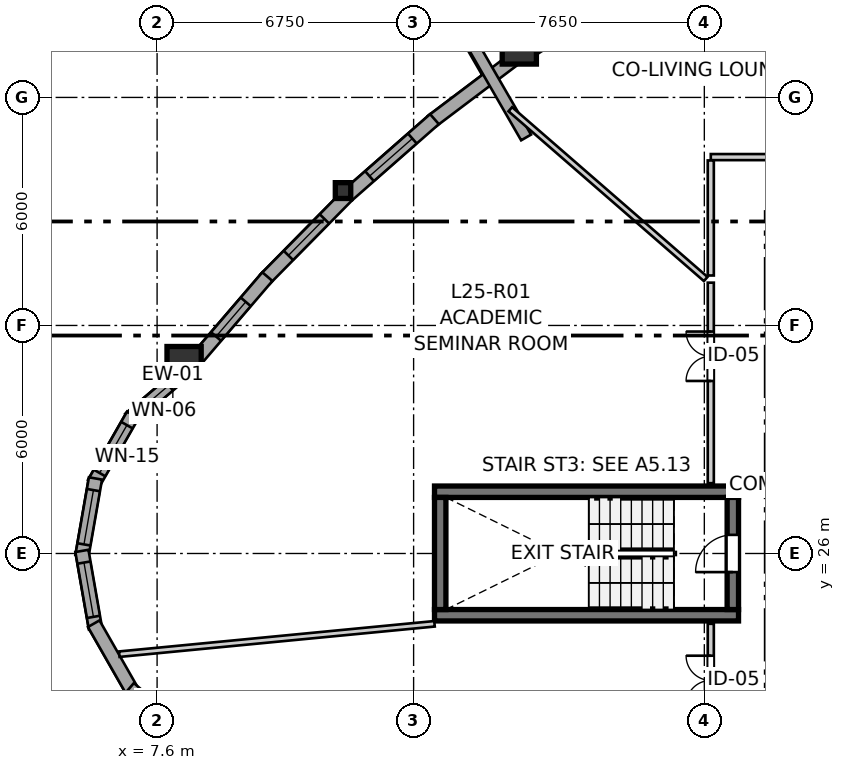
"""IFC4 building model, lengths in metres.
Left out: names, types, materials, properties, quantities, classifications, styles, units other than length and angle.
Written with IfcOpenShell. Run it as: python <this file> out.ifc"""

import sys

from ifc_helpers import new_model, si_unit, direction, frame, frame_2d, origin, origin_2d, place, context, subcontext, project, spatial, rectangle, i_section, extrude, source, transform, mapped, element, fill, save


model = new_model("IFC4")
c1 = context("Model", 3, precision=1e-05, world=origin(), true_north=direction((0.0, 1.0)))
c2 = subcontext(c1, "Body", "Model", "MODEL_VIEW")
j1 = project(units=[si_unit("LENGTHUNIT", "METRE"), si_unit("PLANEANGLEUNIT", "RADIAN")], contexts=[c1])
p1 = place(None, origin())
s1 = spatial("IfcSite", under=j1, at=p1, CompositionType="ELEMENT")
p2 = place(p1, origin())
s2 = spatial("IfcBuilding", under=s1, at=p2, CompositionType="ELEMENT")
p3 = place(p2, frame((0.0, 0.0, 86.4)))
s3 = spatial("IfcBuildingStorey", under=s2, at=p3, CompositionType="ELEMENT", Elevation=86.4)
for number, where, z_axis, x_axis in (
    (1, (14.9, 24.375, 0.0), (0.0, 0.0, 1.0), (1.0, 0.0, 0.0)),
    (2, (22.9, 27.625, 0.0), (0.0, 0.0, 1.0), (-1.0, 0.0, 0.0)),
):
    element("IfcWall", number, at=place(p3, frame(where, z_axis=z_axis, x_axis=x_axis)), inside=s3, PredefinedType="SHEAR", context=c2, shape_type="SweptSolid", body=[
        extrude(rectangle(XDim=8.0, YDim=0.3, at=frame_2d((4.0, 0.0))), origin(), (0.0, 0.0, 1.0), 2.95),
    ])
p4 = place(p3, frame((15.05, 27.475, 0.0), z_axis=(0.0, 0.0, 1.0), x_axis=(0.0, -1.0, 0.0)))
e3 = element("IfcWall", 3, at=p4, inside=s3, PredefinedType="SHEAR", context=c2, shape_type="SweptSolid", body=[
    extrude(rectangle(XDim=2.95, YDim=0.3, at=frame_2d((1.475, 0.0))), origin(), (0.0, 0.0, 1.0), 2.95),
])
p5 = place(p3, frame((22.75, 24.525, 0.0), z_axis=(0.0, 0.0, 1.0), x_axis=(0.0, 1.0, 0.0)))
e4 = element("IfcWall", 4, at=p5, inside=s3, PredefinedType="SHEAR", context=c2, shape_type="SweptSolid", body=[
    extrude(rectangle(XDim=2.95, YDim=0.3, at=frame_2d((1.475, 0.0))), origin(), (0.0, 0.0, 1.0), 2.95),
])
p6 = place(p5, frame((0.985, 0.0, 0.0)))
e5 = element("IfcOpeningElement", 5, at=p6, cuts=e4, PredefinedType="OPENING", context=c2, shape_type="SweptSolid", body=[
    extrude(rectangle(XDim=0.98, YDim=2.15, at=frame_2d((0.49, 1.075))), frame((0.0, 0.16, 0.0), z_axis=(0.0, -1.0, 0.0), x_axis=(1.0, 0.0, 0.0)), (0.0, 0.0, 1.0), 0.32),
])
m1 = source(origin(), c2, "Body", "SweptSolid", [
    extrude(rectangle(XDim=0.9, YDim=0.9, at=origin_2d()), origin(), (0.0, 0.0, 1.0), 2.95),
])
for number, where, z_axis, x_axis in (
    (6, (8.31, 30.996, 0.0), (0.0, 0.0, 1.0), (1.0, 0.0, 0.0)),
    (7, (17.131, 39.327, 0.0), (0.0, 0.0, 1.0), (1.0, 0.0, 0.0)),
):
    element("IfcColumn", number, at=place(p3, frame(where, z_axis=z_axis, x_axis=x_axis)), inside=s3, PredefinedType="COLUMN", context=c2, shape_type="MappedRepresentation", body=[
        mapped(m1, transform((0.0, 0.0, 0.0), x_axis=(1.0, 0.0, 0.0), y_axis=(0.0, 1.0, 0.0), z_axis=(0.0, 0.0, 1.0), scale=1.0)),
    ])
m2 = source(origin(), c2, "Body", "SweptSolid", [
    extrude(i_section(OverallWidth=0.406, OverallDepth=0.416, WebThickness=0.027, FlangeThickness=0.044, FilletRadius=0.015, at=origin_2d()), origin(), (0.0, 0.0, 1.0), 2.95),
])
p7 = place(p3, frame((12.493, 35.549, 0.0), z_axis=(0.0, 0.0, 1.0), x_axis=(1.0, 0.0, 0.0)))
e8 = element("IfcColumn", 8, at=p7, inside=s3, PredefinedType="PILASTER", context=c2, shape_type="MappedRepresentation", body=[
    mapped(m2, transform((0.0, 0.0, 0.0), x_axis=(1.0, 0.0, 0.0), y_axis=(0.0, 1.0, 0.0), z_axis=(0.0, 0.0, 1.0), scale=1.0)),
])
p8 = place(p3, frame((8.253, 30.717, 0.0), z_axis=(0.0, 0.0, 1.0), x_axis=(-0.761176639947, -0.648544618973, 0.0)))
e9 = element("IfcWall", 9, at=p8, inside=s3, PredefinedType="SOLIDWALL", context=c2, shape_type="SweptSolid", body=[
    extrude(rectangle(XDim=1.81, YDim=0.35, at=frame_2d((0.905, 0.0))), origin(), (0.0, 0.0, 1.0), 2.48),
])
p9 = place(p8, frame((0.455, 0.0, 0.82)))
e10 = element("IfcOpeningElement", 10, at=p9, cuts=e9, PredefinedType="OPENING", context=c2, shape_type="SweptSolid", body=[
    extrude(rectangle(XDim=1.05, YDim=1.45, at=frame_2d((0.525, 0.725))), frame((0.0, 0.185, 0.0), z_axis=(0.0, -1.0, 0.0), x_axis=(1.0, 0.0, 0.0)), (0.0, 0.0, 1.0), 0.37),
])
p10 = place(p3, frame((6.961, 29.647, 0.0), z_axis=(0.0, 0.0, 1.0), x_axis=(-0.496037473582, -0.868301114132, 0.0)))
e11 = element("IfcWall", 11, at=p10, inside=s3, PredefinedType="SOLIDWALL", context=c2, shape_type="SweptSolid", body=[
    extrude(rectangle(XDim=2.073, YDim=0.35, at=frame_2d((1.037, 0.0))), origin(), (0.0, 0.0, 1.0), 2.48),
])
p11 = place(p10, frame((0.312, 0.0, 0.82)))
e12 = element("IfcOpeningElement", 12, at=p11, cuts=e11, PredefinedType="OPENING", context=c2, shape_type="SweptSolid", body=[
    extrude(rectangle(XDim=1.45, YDim=1.25, at=frame_2d((0.725, 0.625))), frame((0.0, 0.185, 0.0), z_axis=(0.0, -1.0, 0.0), x_axis=(1.0, 0.0, 0.0)), (0.0, 0.0, 1.0), 0.37),
])
p12 = place(p3, frame((5.979, 27.975, 0.0), z_axis=(0.0, 0.0, 1.0), x_axis=(-0.172166087538, -0.985067935881, 0.0)))
e13 = element("IfcWall", 13, at=p12, inside=s3, PredefinedType="SOLIDWALL", context=c2, shape_type="SweptSolid", body=[
    extrude(rectangle(XDim=2.073, YDim=0.35, at=frame_2d((1.037, 0.0))), origin(), (0.0, 0.0, 1.0), 2.48),
])
p13 = place(p12, frame((0.312, 0.0, 0.82)))
e14 = element("IfcOpeningElement", 14, at=p13, cuts=e13, PredefinedType="OPENING", context=c2, shape_type="SweptSolid", body=[
    extrude(rectangle(XDim=1.45, YDim=1.25, at=frame_2d((0.725, 0.625))), frame((0.0, 0.185, 0.0), z_axis=(0.0, -1.0, 0.0), x_axis=(1.0, 0.0, 0.0)), (0.0, 0.0, 1.0), 0.37),
])
p14 = place(p3, frame((5.622, 26.068, 0.0), z_axis=(0.0, 0.0, 1.0), x_axis=(0.172166087538, -0.985067935881, 0.0)))
e15 = element("IfcWall", 15, at=p14, inside=s3, PredefinedType="SOLIDWALL", context=c2, shape_type="SweptSolid", body=[
    extrude(rectangle(XDim=2.073, YDim=0.35, at=frame_2d((1.037, 0.0))), origin(), (0.0, 0.0, 1.0), 2.48),
])
p15 = place(p14, frame((0.312, 0.0, 0.82)))
e16 = element("IfcOpeningElement", 16, at=p15, cuts=e15, PredefinedType="OPENING", context=c2, shape_type="SweptSolid", body=[
    extrude(rectangle(XDim=1.45, YDim=1.25, at=frame_2d((0.725, 0.625))), frame((0.0, 0.185, 0.0), z_axis=(0.0, -1.0, 0.0), x_axis=(1.0, 0.0, 0.0)), (0.0, 0.0, 1.0), 0.37),
])
p16 = place(p3, frame((5.933, 24.153, 0.0), z_axis=(0.0, 0.0, 1.0), x_axis=(0.496037473582, -0.868301114132, 0.0)))
e17 = element("IfcWall", 17, at=p16, inside=s3, PredefinedType="SOLIDWALL", context=c2, shape_type="SweptSolid", body=[
    extrude(rectangle(XDim=2.073, YDim=0.35, at=frame_2d((1.037, 0.0))), origin(), (0.0, 0.0, 1.0), 2.48),
])
p17 = place(p3, frame((6.875, 22.457, 0.0), z_axis=(0.0, 0.0, 1.0), x_axis=(0.761203352049, -0.648513266502, 0.0)))
e18 = element("IfcWall", 18, at=p17, inside=s3, PredefinedType="SOLIDWALL", context=c2, shape_type="SweptSolid", body=[
    extrude(rectangle(XDim=2.015, YDim=0.35, at=frame_2d((1.007, 0.0))), origin(), (0.0, 0.0, 1.0), 2.48),
])
p18 = place(p17, frame((0.393, 0.0, 0.82)))
e19 = element("IfcOpeningElement", 19, at=p18, cuts=e18, PredefinedType="OPENING", context=c2, shape_type="SweptSolid", body=[
    extrude(rectangle(XDim=1.25, YDim=1.35, at=frame_2d((0.625, 0.675))), frame((0.0, 0.185, 0.0), z_axis=(0.0, -1.0, 0.0), x_axis=(1.0, 0.0, 0.0)), (0.0, 0.0, 1.0), 0.37),
])
p19 = place(p3, frame((17.057, 39.052, 0.0), z_axis=(0.0, 0.0, 1.0), x_axis=(-0.798379678642, -0.602154372841, 0.0)))
e20 = element("IfcWall", 20, at=p19, inside=s3, PredefinedType="SOLIDWALL", context=c2, shape_type="SweptSolid", body=[
    extrude(rectangle(XDim=2.79, YDim=0.35, at=frame_2d((1.395, 0.0))), origin(), (0.0, 0.0, 1.0), 2.48),
])
p20 = place(p3, frame((14.899, 37.429, 0.0), z_axis=(0.0, 0.0, 1.0), x_axis=(-0.751526984469, -0.659702350773, 0.0)))
e21 = element("IfcWall", 21, at=p20, inside=s3, PredefinedType="SOLIDWALL", context=c2, shape_type="SweptSolid", body=[
    extrude(rectangle(XDim=3.028, YDim=0.35, at=frame_2d((1.514, 0.0))), origin(), (0.0, 0.0, 1.0), 2.48),
])
p21 = place(p20, frame((0.774, 0.0, 0.82)))
e22 = element("IfcOpeningElement", 22, at=p21, cuts=e21, PredefinedType="OPENING", context=c2, shape_type="SweptSolid", body=[
    extrude(rectangle(XDim=1.5, YDim=1.45, at=frame_2d((0.75, 0.725))), frame((0.0, 0.185, 0.0), z_axis=(0.0, -1.0, 0.0), x_axis=(1.0, 0.0, 0.0)), (0.0, 0.0, 1.0), 0.37),
])
p22 = place(p3, frame((12.603, 35.412, 0.0), z_axis=(0.0, 0.0, 1.0), x_axis=(-0.701972782373, -0.71220377197, 0.0)))
e23 = element("IfcWall", 23, at=p22, inside=s3, PredefinedType="SOLIDWALL", context=c2, shape_type="SweptSolid", body=[
    extrude(rectangle(XDim=3.078, YDim=0.35, at=frame_2d((1.539, 0.0))), origin(), (0.0, 0.0, 1.0), 2.48),
])
p23 = place(p22, frame((0.854, 0.0, 0.82)))
e24 = element("IfcOpeningElement", 24, at=p23, cuts=e23, PredefinedType="OPENING", context=c2, shape_type="SweptSolid", body=[
    extrude(rectangle(XDim=1.35, YDim=1.45, at=frame_2d((0.675, 0.725))), frame((0.0, 0.185, 0.0), z_axis=(0.0, -1.0, 0.0), x_axis=(1.0, 0.0, 0.0)), (0.0, 0.0, 1.0), 0.37),
])
p24 = place(p3, frame((10.502, 33.285, 0.0), z_axis=(0.0, 0.0, 1.0), x_axis=(-0.650770847407, -0.75927419564, 0.0)))
e25 = element("IfcWall", 25, at=p24, inside=s3, PredefinedType="SOLIDWALL", context=c2, shape_type="SweptSolid", body=[
    extrude(rectangle(XDim=2.938, YDim=0.35, at=frame_2d((1.469, 0.0))), origin(), (0.0, 0.0, 1.0), 2.48),
])
p25 = place(p24, frame((0.874, 0.0, 0.82)))
e26 = element("IfcOpeningElement", 26, at=p25, cuts=e25, PredefinedType="OPENING", context=c2, shape_type="SweptSolid", body=[
    extrude(rectangle(XDim=1.2, YDim=1.45, at=frame_2d((0.6, 0.725))), frame((0.0, 0.185, 0.0), z_axis=(0.0, -1.0, 0.0), x_axis=(1.0, 0.0, 0.0)), (0.0, 0.0, 1.0), 0.37),
])
p26 = place(p3, frame((17.31, 36.946, 0.0), z_axis=(0.0, 0.0, 1.0), x_axis=(-0.499999403898, 0.866025747944, 0.0)))
e27 = element("IfcWall", 27, at=p26, inside=s3, PredefinedType="SOLIDWALL", context=c2, shape_type="SweptSolid", body=[
    extrude(rectangle(XDim=20.603, YDim=0.3, at=frame_2d((10.302, 0.0))), origin(), (0.0, 0.0, 1.0), 2.13),
])
p27 = place(p3, frame((22.17, 27.85, 0.0), z_axis=(0.0, 0.0, 1.0), x_axis=(0.0, 1.0, 0.0)))
e28 = element("IfcWall", 28, at=p27, inside=s3, PredefinedType="PARTITIONING", context=c2, shape_type="SweptSolid", body=[
    extrude(rectangle(XDim=5.276, YDim=0.16, at=frame_2d((2.638, 0.0))), origin(), (0.0, 0.0, 1.0), 2.95),
])
p28 = place(p27, frame((2.689, 0.0, 0.0)))
e29 = element("IfcOpeningElement", 29, at=p28, cuts=e28, PredefinedType="OPENING", context=c2, shape_type="SweptSolid", body=[
    extrude(rectangle(XDim=1.3, YDim=2.1, at=frame_2d((0.65, 1.05))), frame((0.0, 0.09, 0.0), z_axis=(0.0, -1.0, 0.0), x_axis=(1.0, 0.0, 0.0)), (0.0, 0.0, 1.0), 0.18),
])
p29 = place(p3, frame((22.17, 36.43, 0.0), z_axis=(0.0, 0.0, 1.0), x_axis=(1.0, 0.0, 0.0)))
e30 = element("IfcWall", 30, at=p29, inside=s3, PredefinedType="PARTITIONING", context=c2, shape_type="SweptSolid", body=[
    extrude(rectangle(XDim=5.122, YDim=0.16, at=frame_2d((2.561, 0.0))), origin(), (0.0, 0.0, 1.0), 2.588),
])
p30 = place(p29, frame((1.903, 0.0, 0.0)))
e31 = element("IfcOpeningElement", 31, at=p30, cuts=e30, PredefinedType="OPENING", context=c2, shape_type="SweptSolid", body=[
    extrude(rectangle(XDim=1.3, YDim=2.1, at=frame_2d((0.65, 1.05))), frame((0.0, 0.09, 0.0), z_axis=(0.0, -1.0, 0.0), x_axis=(1.0, 0.0, 0.0)), (0.0, 0.0, 1.0), 0.18),
])
p31 = place(p3, frame((22.17, 21.128, 0.0), z_axis=(0.0, 0.0, 1.0), x_axis=(0.0, 1.0, 0.0)))
e32 = element("IfcWall", 32, at=p31, inside=s3, PredefinedType="PARTITIONING", context=c2, shape_type="SweptSolid", body=[
    extrude(rectangle(XDim=3.022, YDim=0.16, at=frame_2d((1.511, 0.0))), origin(), (0.0, 0.0, 1.0), 2.95),
])
p32 = place(p31, frame((0.883, 0.0, 0.0)))
e33 = element("IfcOpeningElement", 33, at=p32, cuts=e32, PredefinedType="OPENING", context=c2, shape_type="SweptSolid", body=[
    extrude(rectangle(XDim=1.3, YDim=2.1, at=frame_2d((0.65, 1.05))), frame((0.0, 0.09, 0.0), z_axis=(0.0, -1.0, 0.0), x_axis=(1.0, 0.0, 0.0)), (0.0, 0.0, 1.0), 0.18),
])
p33 = place(p3, frame((6.605, 23.351, 0.0), z_axis=(0.0, 0.0, 1.0), x_axis=(0.995388985265, 0.09592063393, 0.0)))
e34 = element("IfcWall", 34, at=p33, inside=s3, PredefinedType="PARTITIONING", context=c2, shape_type="SweptSolid", body=[
    extrude(rectangle(XDim=8.333, YDim=0.145, at=frame_2d((4.167, 0.0))), origin(), (0.0, 0.0, 1.0), 2.95),
])
p34 = place(p3, frame((16.895, 37.69, 0.0), z_axis=(0.0, 0.0, 1.0), x_axis=(0.754854710059, -0.655892038907, 0.0)))
e35 = element("IfcWall", 35, at=p34, inside=s3, PredefinedType="PARTITIONING", context=c2, shape_type="SweptSolid", body=[
    extrude(rectangle(XDim=6.811, YDim=0.145, at=frame_2d((3.406, 0.0))), origin(), (0.0, 0.0, 1.0), 2.118),
])
p35 = place(p3, frame((22.17, 33.315, 0.0), z_axis=(0.0, 0.0, 1.0), x_axis=(0.0, 1.0, 0.0)))
e36 = element("IfcWall", 36, at=p35, inside=s3, PredefinedType="PARTITIONING", context=c2, shape_type="SweptSolid", body=[
    extrude(rectangle(XDim=3.027, YDim=0.16, at=frame_2d((1.514, 0.0))), origin(), (0.0, 0.0, 1.0), 2.95),
])
p36 = place(p3, frame((17.326, 39.048, 0.0), z_axis=(0.0, 0.0, 1.0), x_axis=(0.841527071554, 0.540214945963, 0.0)))
e37 = element("IfcWall", 37, at=p36, inside=s3, PredefinedType="PARTITIONING", context=c2, shape_type="SweptSolid", body=[
    extrude(rectangle(XDim=2.934, YDim=0.145, at=frame_2d((1.467, 0.0))), origin(), (0.0, 0.0, 1.0), 2.468),
])
m3 = source(origin(), c2, "Body", "SweptSolid", [
    extrude(rectangle(XDim=1.05, YDim=1.45, at=frame_2d((0.525, 0.725))), frame((0.0, 0.03, 0.0), z_axis=(0.0, -1.0, 0.0), x_axis=(1.0, 0.0, 0.0)), (0.0, 0.0, 1.0), 0.06),
])
p37 = place(p9, origin())
e38 = element("IfcWindow", 38, at=p37, inside=s3, PartitioningType="SINGLE_PANEL", PredefinedType="WINDOW", context=c2, shape_type="MappedRepresentation", body=[
    mapped(m3, transform((0.0, 0.0, 0.0), x_axis=(1.0, 0.0, 0.0), y_axis=(0.0, 1.0, 0.0), z_axis=(0.0, 0.0, 1.0), scale=1.0)),
])
fill(e10, e38)
m4 = source(origin(), c2, "Body", "SweptSolid", [
    extrude(rectangle(XDim=1.45, YDim=1.25, at=frame_2d((0.725, 0.625))), frame((0.0, 0.03, 0.0), z_axis=(0.0, -1.0, 0.0), x_axis=(1.0, 0.0, 0.0)), (0.0, 0.0, 1.0), 0.06),
])
p38 = place(p11, origin())
e39 = element("IfcWindow", 39, at=p38, inside=s3, PartitioningType="SINGLE_PANEL", PredefinedType="WINDOW", context=c2, shape_type="MappedRepresentation", body=[
    mapped(m4, transform((0.0, 0.0, 0.0), x_axis=(1.0, 0.0, 0.0), y_axis=(0.0, 1.0, 0.0), z_axis=(0.0, 0.0, 1.0), scale=1.0)),
])
fill(e12, e39)
p39 = place(p13, origin())
e40 = element("IfcWindow", 40, at=p39, inside=s3, PartitioningType="SINGLE_PANEL", PredefinedType="WINDOW", context=c2, shape_type="MappedRepresentation", body=[
    mapped(m4, transform((0.0, 0.0, 0.0), x_axis=(1.0, 0.0, 0.0), y_axis=(0.0, 1.0, 0.0), z_axis=(0.0, 0.0, 1.0), scale=1.0)),
])
fill(e14, e40)
p40 = place(p15, origin())
e41 = element("IfcWindow", 41, at=p40, inside=s3, PartitioningType="SINGLE_PANEL", PredefinedType="WINDOW", context=c2, shape_type="MappedRepresentation", body=[
    mapped(m4, transform((0.0, 0.0, 0.0), x_axis=(1.0, 0.0, 0.0), y_axis=(0.0, 1.0, 0.0), z_axis=(0.0, 0.0, 1.0), scale=1.0)),
])
fill(e16, e41)
m5 = source(origin(), c2, "Body", "SweptSolid", [
    extrude(rectangle(XDim=1.5, YDim=1.45, at=frame_2d((0.75, 0.725))), frame((0.0, 0.03, 0.0), z_axis=(0.0, -1.0, 0.0), x_axis=(1.0, 0.0, 0.0)), (0.0, 0.0, 1.0), 0.06),
])
p41 = place(p21, origin())
e42 = element("IfcWindow", 42, at=p41, inside=s3, PartitioningType="SINGLE_PANEL", PredefinedType="WINDOW", context=c2, shape_type="MappedRepresentation", body=[
    mapped(m5, transform((0.0, 0.0, 0.0), x_axis=(1.0, 0.0, 0.0), y_axis=(0.0, 1.0, 0.0), z_axis=(0.0, 0.0, 1.0), scale=1.0)),
])
fill(e22, e42)
m6 = source(origin(), c2, "Body", "SweptSolid", [
    extrude(rectangle(XDim=1.35, YDim=1.45, at=frame_2d((0.675, 0.725))), frame((0.0, 0.03, 0.0), z_axis=(0.0, -1.0, 0.0), x_axis=(1.0, 0.0, 0.0)), (0.0, 0.0, 1.0), 0.06),
])
p42 = place(p23, origin())
e43 = element("IfcWindow", 43, at=p42, inside=s3, PartitioningType="SINGLE_PANEL", PredefinedType="WINDOW", context=c2, shape_type="MappedRepresentation", body=[
    mapped(m6, transform((0.0, 0.0, 0.0), x_axis=(1.0, 0.0, 0.0), y_axis=(0.0, 1.0, 0.0), z_axis=(0.0, 0.0, 1.0), scale=1.0)),
])
fill(e24, e43)
m7 = source(origin(), c2, "Body", "SweptSolid", [
    extrude(rectangle(XDim=1.2, YDim=1.45, at=frame_2d((0.6, 0.725))), frame((0.0, 0.03, 0.0), z_axis=(0.0, -1.0, 0.0), x_axis=(1.0, 0.0, 0.0)), (0.0, 0.0, 1.0), 0.06),
])
p43 = place(p25, origin())
e44 = element("IfcWindow", 44, at=p43, inside=s3, PartitioningType="SINGLE_PANEL", PredefinedType="WINDOW", context=c2, shape_type="MappedRepresentation", body=[
    mapped(m7, transform((0.0, 0.0, 0.0), x_axis=(1.0, 0.0, 0.0), y_axis=(0.0, 1.0, 0.0), z_axis=(0.0, 0.0, 1.0), scale=1.0)),
])
fill(e26, e44)
m8 = source(origin(), c2, "Body", "SweptSolid", [
    extrude(rectangle(XDim=0.98, YDim=2.15, at=frame_2d((0.49, 1.075))), frame((0.0, 0.025, 0.0), z_axis=(0.0, -1.0, 0.0), x_axis=(1.0, 0.0, 0.0)), (0.0, 0.0, 1.0), 0.05),
])
p44 = place(p6, origin())
e45 = element("IfcDoor", 45, at=p44, inside=s3, OperationType="SINGLE_SWING_LEFT", PredefinedType="DOOR", context=c2, shape_type="MappedRepresentation", body=[
    mapped(m8, transform((0.0, 0.0, 0.0), x_axis=(1.0, 0.0, 0.0), y_axis=(0.0, 1.0, 0.0), z_axis=(0.0, 0.0, 1.0), scale=1.0)),
])
fill(e5, e45)
m9 = source(origin(), c2, "Body", "SweptSolid", [
    extrude(rectangle(XDim=1.3, YDim=2.1, at=frame_2d((0.65, 1.05))), frame((0.0, 0.025, 0.0), z_axis=(0.0, -1.0, 0.0), x_axis=(1.0, 0.0, 0.0)), (0.0, 0.0, 1.0), 0.05),
])
p45 = place(p28, origin())
e46 = element("IfcDoor", 46, at=p45, inside=s3, OperationType="DOUBLE_DOOR_SINGLE_SWING", PredefinedType="DOOR", context=c2, shape_type="MappedRepresentation", body=[
    mapped(m9, transform((0.0, 0.0, 0.0), x_axis=(1.0, 0.0, 0.0), y_axis=(0.0, 1.0, 0.0), z_axis=(0.0, 0.0, 1.0), scale=1.0)),
])
fill(e29, e46)
p46 = place(p32, origin())
e47 = element("IfcDoor", 47, at=p46, inside=s3, OperationType="DOUBLE_DOOR_SINGLE_SWING", PredefinedType="DOOR", context=c2, shape_type="MappedRepresentation", body=[
    mapped(m9, transform((0.0, 0.0, 0.0), x_axis=(1.0, 0.0, 0.0), y_axis=(0.0, 1.0, 0.0), z_axis=(0.0, 0.0, 1.0), scale=1.0)),
])
fill(e33, e47)
save(model, sys.argv[1])
